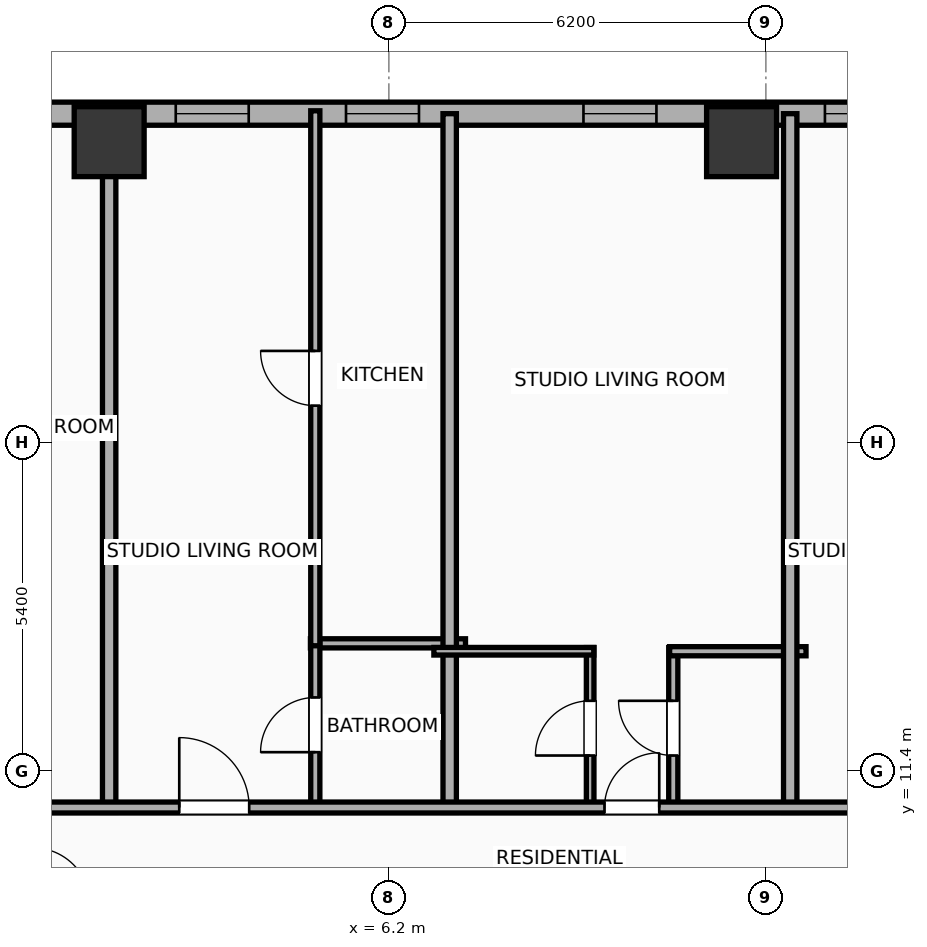
"""IFC4 building model, lengths in metres.
Left out: names, types, materials, properties, quantities, classifications, styles, units other than length and angle.
Written with IfcOpenShell. Run it as: python <this file> out.ifc"""

import sys

from ifc_helpers import new_model, si_unit, direction, frame, frame_2d, origin, origin_2d, place, context, subcontext, project, spatial, rectangle, hollow_rectangle, extrude, element, fill, save


model = new_model("IFC4")
c1 = context("Model", 3, precision=1e-05, world=origin(), true_north=direction((0.0, 1.0)))
c2 = subcontext(c1, "Body", "Model", "MODEL_VIEW")
j1 = project(units=[si_unit("LENGTHUNIT", "METRE"), si_unit("PLANEANGLEUNIT", "RADIAN")], contexts=[c1])
p1 = place(None, origin())
s1 = spatial("IfcSite", under=j1, at=p1, CompositionType="ELEMENT")
p2 = place(p1, origin())
s2 = spatial("IfcBuilding", under=s1, at=p2, CompositionType="ELEMENT")
p3 = place(p2, frame((0.0, 0.0, 29.9)))
s3 = spatial("IfcBuildingStorey", under=s2, at=p3, CompositionType="ELEMENT", Elevation=29.9)
for number, where, z_axis, x_axis in (
    (1, (12.0, 21.75, 0.0), (0.0, 0.0, 1.0), (1.0, 0.0, 0.0)),
    (2, (1.6, 21.75, 0.0), (0.0, 0.0, 1.0), (1.0, 0.0, 0.0)),
):
    element("IfcColumn", number, at=place(p3, frame(where, z_axis=z_axis, x_axis=x_axis)), inside=s3, PredefinedType="COLUMN", context=c2, shape_type="SweptSolid", body=[
        extrude(hollow_rectangle(XDim=1.15, YDim=1.15, WallThickness=0.04, at=origin_2d()), origin(), (0.0, 0.0, 1.0), 3.9),
    ])
p4 = place(p3, frame((-29.581, 22.21, 0.0), z_axis=(0.0, 0.0, 1.0), x_axis=(1.0, 0.0, 0.0)))
e3 = element("IfcWall", 3, at=p4, inside=s3, PredefinedType="ELEMENTEDWALL", context=c2, shape_type="SweptSolid", body=[
    extrude(rectangle(XDim=51.963, YDim=0.38, at=frame_2d((25.981, 0.0))), origin(), (0.0, 0.0, 1.0), 2.54),
])
p5 = place(p4, frame((5.81, 0.0, 0.75)))
e4 = element("IfcOpeningElement", 4, at=p5, cuts=e3, PredefinedType="OPENING", context=c2, shape_type="SweptSolid", body=[
    extrude(rectangle(XDim=2.4, YDim=1.63, at=frame_2d((1.2, 0.815))), frame((0.0, 0.2, 0.0), z_axis=(0.0, -1.0, 0.0), x_axis=(1.0, 0.0, 0.0)), (0.0, 0.0, 1.0), 0.4),
])
p6 = place(p4, frame((42.952, 0.0, 0.75)))
e5 = element("IfcOpeningElement", 5, at=p6, cuts=e3, PredefinedType="OPENING", context=c2, shape_type="SweptSolid", body=[
    extrude(rectangle(XDim=2.4, YDim=1.63, at=frame_2d((1.2, 0.815))), frame((0.0, 0.2, 0.0), z_axis=(0.0, -1.0, 0.0), x_axis=(1.0, 0.0, 0.0)), (0.0, 0.0, 1.0), 0.4),
])
p7 = place(p4, frame((1.436, 0.0, 0.75)))
e6 = element("IfcOpeningElement", 6, at=p7, cuts=e3, PredefinedType="OPENING", context=c2, shape_type="SweptSolid", body=[
    extrude(rectangle(XDim=1.2, YDim=1.63, at=frame_2d((0.6, 0.815))), frame((0.0, 0.2, 0.0), z_axis=(0.0, -1.0, 0.0), x_axis=(1.0, 0.0, 0.0)), (0.0, 0.0, 1.0), 0.4),
])
p8 = place(p4, frame((3.686, 0.0, 0.75)))
e7 = element("IfcOpeningElement", 7, at=p8, cuts=e3, PredefinedType="OPENING", context=c2, shape_type="SweptSolid", body=[
    extrude(rectangle(XDim=1.2, YDim=1.63, at=frame_2d((0.6, 0.815))), frame((0.0, 0.2, 0.0), z_axis=(0.0, -1.0, 0.0), x_axis=(1.0, 0.0, 0.0)), (0.0, 0.0, 1.0), 0.4),
])
p9 = place(p4, frame((11.221, 0.0, 0.75)))
e8 = element("IfcOpeningElement", 8, at=p9, cuts=e3, PredefinedType="OPENING", context=c2, shape_type="SweptSolid", body=[
    extrude(rectangle(XDim=1.2, YDim=1.63, at=frame_2d((0.6, 0.815))), frame((0.0, 0.2, 0.0), z_axis=(0.0, -1.0, 0.0), x_axis=(1.0, 0.0, 0.0)), (0.0, 0.0, 1.0), 0.4),
])
p10 = place(p4, frame((17.686, 0.0, 0.75)))
e9 = element("IfcOpeningElement", 9, at=p10, cuts=e3, PredefinedType="OPENING", context=c2, shape_type="SweptSolid", body=[
    extrude(rectangle(XDim=1.2, YDim=1.63, at=frame_2d((0.6, 0.815))), frame((0.0, 0.2, 0.0), z_axis=(0.0, -1.0, 0.0), x_axis=(1.0, 0.0, 0.0)), (0.0, 0.0, 1.0), 0.4),
])
p11 = place(p4, frame((14.886, 0.0, 0.75)))
e10 = element("IfcOpeningElement", 10, at=p11, cuts=e3, PredefinedType="OPENING", context=c2, shape_type="SweptSolid", body=[
    extrude(rectangle(XDim=1.2, YDim=1.63, at=frame_2d((0.6, 0.815))), frame((0.0, 0.2, 0.0), z_axis=(0.0, -1.0, 0.0), x_axis=(1.0, 0.0, 0.0)), (0.0, 0.0, 1.0), 0.4),
])
p12 = place(p4, frame((22.181, 0.0, 0.75)))
e11 = element("IfcOpeningElement", 11, at=p12, cuts=e3, PredefinedType="OPENING", context=c2, shape_type="SweptSolid", body=[
    extrude(rectangle(XDim=1.2, YDim=1.63, at=frame_2d((0.6, 0.815))), frame((0.0, 0.2, 0.0), z_axis=(0.0, -1.0, 0.0), x_axis=(1.0, 0.0, 0.0)), (0.0, 0.0, 1.0), 0.4),
])
p13 = place(p4, frame((28.926, 0.0, 0.75)))
e12 = element("IfcOpeningElement", 12, at=p13, cuts=e3, PredefinedType="OPENING", context=c2, shape_type="SweptSolid", body=[
    extrude(rectangle(XDim=1.2, YDim=1.63, at=frame_2d((0.6, 0.815))), frame((0.0, 0.2, 0.0), z_axis=(0.0, -1.0, 0.0), x_axis=(1.0, 0.0, 0.0)), (0.0, 0.0, 1.0), 0.4),
])
p14 = place(p4, frame((26.126, 0.0, 0.75)))
e13 = element("IfcOpeningElement", 13, at=p14, cuts=e3, PredefinedType="OPENING", context=c2, shape_type="SweptSolid", body=[
    extrude(rectangle(XDim=1.2, YDim=1.63, at=frame_2d((0.6, 0.815))), frame((0.0, 0.2, 0.0), z_axis=(0.0, -1.0, 0.0), x_axis=(1.0, 0.0, 0.0)), (0.0, 0.0, 1.0), 0.4),
])
p15 = place(p4, frame((32.276, 0.0, 0.75)))
e14 = element("IfcOpeningElement", 14, at=p15, cuts=e3, PredefinedType="OPENING", context=c2, shape_type="SweptSolid", body=[
    extrude(rectangle(XDim=1.2, YDim=1.63, at=frame_2d((0.6, 0.815))), frame((0.0, 0.2, 0.0), z_axis=(0.0, -1.0, 0.0), x_axis=(1.0, 0.0, 0.0)), (0.0, 0.0, 1.0), 0.4),
])
p16 = place(p4, frame((35.076, 0.0, 0.75)))
e15 = element("IfcOpeningElement", 15, at=p16, cuts=e3, PredefinedType="OPENING", context=c2, shape_type="SweptSolid", body=[
    extrude(rectangle(XDim=1.2, YDim=1.63, at=frame_2d((0.6, 0.815))), frame((0.0, 0.2, 0.0), z_axis=(0.0, -1.0, 0.0), x_axis=(1.0, 0.0, 0.0)), (0.0, 0.0, 1.0), 0.4),
])
p17 = place(p4, frame((38.981, 0.0, 0.75)))
e16 = element("IfcOpeningElement", 16, at=p17, cuts=e3, PredefinedType="OPENING", context=c2, shape_type="SweptSolid", body=[
    extrude(rectangle(XDim=1.2, YDim=1.63, at=frame_2d((0.6, 0.815))), frame((0.0, 0.2, 0.0), z_axis=(0.0, -1.0, 0.0), x_axis=(1.0, 0.0, 0.0)), (0.0, 0.0, 1.0), 0.4),
])
p18 = place(p4, frame((46.276, 0.0, 0.75)))
e17 = element("IfcOpeningElement", 17, at=p18, cuts=e3, PredefinedType="OPENING", context=c2, shape_type="SweptSolid", body=[
    extrude(rectangle(XDim=1.2, YDim=1.63, at=frame_2d((0.6, 0.815))), frame((0.0, 0.2, 0.0), z_axis=(0.0, -1.0, 0.0), x_axis=(1.0, 0.0, 0.0)), (0.0, 0.0, 1.0), 0.4),
])
p19 = place(p4, frame((48.927, 0.0, 0.75)))
e18 = element("IfcOpeningElement", 18, at=p19, cuts=e3, PredefinedType="OPENING", context=c2, shape_type="SweptSolid", body=[
    extrude(rectangle(XDim=1.2, YDim=1.63, at=frame_2d((0.6, 0.815))), frame((0.0, 0.2, 0.0), z_axis=(0.0, -1.0, 0.0), x_axis=(1.0, 0.0, 0.0)), (0.0, 0.0, 1.0), 0.4),
])
p20 = place(p3, frame((1.6, 10.72, 0.0), z_axis=(0.0, 0.0, 1.0), x_axis=(0.0, 1.0, 0.0)))
e19 = element("IfcWall", 19, at=p20, inside=s3, PredefinedType="PARTITIONING", context=c2, shape_type="SweptSolid", body=[
    extrude(rectangle(XDim=11.49, YDim=0.22, at=frame_2d((5.745, 0.0))), origin(), (0.0, 0.0, 1.0), 2.54),
])
p21 = place(p3, frame((4.91, 13.5, 0.0), z_axis=(0.0, 0.0, 1.0), x_axis=(1.0, 0.0, 0.0)))
e20 = element("IfcWall", 20, at=p21, inside=s3, PredefinedType="PLUMBINGWALL", context=c2, shape_type="SweptSolid", body=[
    extrude(rectangle(XDim=2.55, YDim=0.15, at=frame_2d((1.275, 0.0))), origin(), (0.0, 0.0, 1.0), 3.65),
])
p22 = place(p3, frame((4.99, 10.78, 0.0), z_axis=(0.0, 0.0, 1.0), x_axis=(0.0, 1.0, 0.0)))
e21 = element("IfcWall", 21, at=p22, inside=s3, PredefinedType="PLUMBINGWALL", context=c2, shape_type="SweptSolid", body=[
    extrude(rectangle(XDim=2.76, YDim=0.15, at=frame_2d((1.38, 0.0))), origin(), (0.0, 0.0, 1.0), 3.65),
])
p23 = place(p22, frame((0.93, 0.0, 0.0)))
e22 = element("IfcOpeningElement", 22, at=p23, cuts=e21, PredefinedType="OPENING", context=c2, shape_type="SweptSolid", body=[
    extrude(rectangle(XDim=0.9, YDim=2.05, at=frame_2d((0.45, 1.025))), frame((0.0, 0.085, 0.0), z_axis=(0.0, -1.0, 0.0), x_axis=(1.0, 0.0, 0.0)), (0.0, 0.0, 1.0), 0.17),
])
p24 = place(p3, frame((4.99, 13.46, 0.0), z_axis=(0.0, 0.0, 1.0), x_axis=(0.0, 1.0, 0.0)))
e23 = element("IfcWall", 23, at=p24, inside=s3, PredefinedType="PLUMBINGWALL", context=c2, shape_type="SweptSolid", body=[
    extrude(rectangle(XDim=8.798, YDim=0.15, at=frame_2d((4.399, 0.0))), origin(), (0.0, 0.0, 1.0), 3.65),
])
p25 = place(p24, frame((3.949, 0.0, 0.0)))
e24 = element("IfcOpeningElement", 24, at=p25, cuts=e23, PredefinedType="OPENING", context=c2, shape_type="SweptSolid", body=[
    extrude(rectangle(XDim=0.9, YDim=2.05, at=frame_2d((0.45, 1.025))), frame((0.0, 0.085, 0.0), z_axis=(0.0, -1.0, 0.0), x_axis=(1.0, 0.0, 0.0)), (0.0, 0.0, 1.0), 0.17),
])
p26 = place(p3, frame((7.2, 10.72, 0.0), z_axis=(0.0, 0.0, 1.0), x_axis=(0.0, 1.0, 0.0)))
e25 = element("IfcWall", 25, at=p26, inside=s3, PredefinedType="PARTITIONING", context=c2, shape_type="SweptSolid", body=[
    extrude(rectangle(XDim=11.49, YDim=0.22, at=frame_2d((5.745, 0.0))), origin(), (0.0, 0.0, 1.0), 3.65),
])
p27 = place(p3, frame((9.51, 10.78, 0.0), z_axis=(0.0, 0.0, 1.0), x_axis=(0.0, 1.0, 0.0)))
e26 = element("IfcWall", 26, at=p27, inside=s3, PredefinedType="PARTITIONING", context=c2, shape_type="SweptSolid", body=[
    extrude(rectangle(XDim=2.65, YDim=0.125, at=frame_2d((1.325, 0.0))), origin(), (0.0, 0.0, 1.0), 3.65),
])
p28 = place(p27, frame((0.875, 0.0, 0.0)))
e27 = element("IfcOpeningElement", 27, at=p28, cuts=e26, PredefinedType="OPENING", context=c2, shape_type="SweptSolid", body=[
    extrude(rectangle(XDim=0.9, YDim=2.05, at=frame_2d((0.45, 1.025))), frame((0.0, 0.073, 0.0), z_axis=(0.0, -1.0, 0.0), x_axis=(1.0, 0.0, 0.0)), (0.0, 0.0, 1.0), 0.145),
])
p29 = place(p3, frame((10.877, 10.78, 0.0), z_axis=(0.0, 0.0, 1.0), x_axis=(0.0, 1.0, 0.0)))
e28 = element("IfcWall", 28, at=p29, inside=s3, PredefinedType="PLUMBINGWALL", context=c2, shape_type="SweptSolid", body=[
    extrude(rectangle(XDim=2.65, YDim=0.15, at=frame_2d((1.325, 0.0))), origin(), (0.0, 0.0, 1.0), 3.65),
])
p30 = place(p29, frame((0.875, 0.0, 0.0)))
e29 = element("IfcOpeningElement", 29, at=p30, cuts=e28, PredefinedType="OPENING", context=c2, shape_type="SweptSolid", body=[
    extrude(rectangle(XDim=0.9, YDim=2.05, at=frame_2d((0.45, 1.025))), frame((0.0, 0.085, 0.0), z_axis=(0.0, -1.0, 0.0), x_axis=(1.0, 0.0, 0.0)), (0.0, 0.0, 1.0), 0.17),
])
p31 = place(p3, frame((6.94, 13.37, 0.0), z_axis=(0.0, 0.0, 1.0), x_axis=(1.0, 0.0, 0.0)))
e30 = element("IfcWall", 30, at=p31, inside=s3, PredefinedType="PARTITIONING", context=c2, shape_type="SweptSolid", body=[
    extrude(rectangle(XDim=2.63, YDim=0.125, at=frame_2d((1.315, 0.0))), origin(), (0.0, 0.0, 1.0), 3.65),
])
p32 = place(p3, frame((10.817, 13.37, 0.0), z_axis=(0.0, 0.0, 1.0), x_axis=(1.0, 0.0, 0.0)))
e31 = element("IfcWall", 31, at=p32, inside=s3, PredefinedType="PLUMBINGWALL", context=c2, shape_type="SweptSolid", body=[
    extrude(rectangle(XDim=2.243, YDim=0.15, at=frame_2d((1.122, 0.0))), origin(), (0.0, 0.0, 1.0), 3.65),
])
p33 = place(p3, frame((12.8, 10.72, 0.0), z_axis=(0.0, 0.0, 1.0), x_axis=(0.0, 1.0, 0.0)))
e32 = element("IfcWall", 32, at=p33, inside=s3, PredefinedType="PARTITIONING", context=c2, shape_type="SweptSolid", body=[
    extrude(rectangle(XDim=11.49, YDim=0.22, at=frame_2d((5.745, 0.0))), origin(), (0.0, 0.0, 1.0), 2.54),
])
p34 = place(p3, frame((-33.41, 10.8, 0.0), z_axis=(0.0, 0.0, 1.0), x_axis=(1.0, 0.0, 0.0)))
e33 = element("IfcWall", 33, at=p34, inside=s3, PredefinedType="PARTITIONING", context=c2, shape_type="SweptSolid", body=[
    extrude(rectangle(XDim=59.62, YDim=0.18, at=frame_2d((29.81, 0.0))), origin(), (0.0, 0.0, 1.0), 3.65),
])
p35 = place(p34, frame((3.062, 0.0, 0.0)))
e34 = element("IfcOpeningElement", 34, at=p35, cuts=e33, PredefinedType="OPENING", context=c2, shape_type="SweptSolid", body=[
    extrude(rectangle(XDim=1.15, YDim=2.05, at=frame_2d((0.575, 1.025))), frame((0.0, 0.1, 0.0), z_axis=(0.0, -1.0, 0.0), x_axis=(1.0, 0.0, 0.0)), (0.0, 0.0, 1.0), 0.2),
])
p36 = place(p34, frame((10.312, 0.0, 0.0)))
e35 = element("IfcOpeningElement", 35, at=p36, cuts=e33, PredefinedType="OPENING", context=c2, shape_type="SweptSolid", body=[
    extrude(rectangle(XDim=1.15, YDim=2.05, at=frame_2d((0.575, 1.025))), frame((0.0, 0.1, 0.0), z_axis=(0.0, -1.0, 0.0), x_axis=(1.0, 0.0, 0.0)), (0.0, 0.0, 1.0), 0.2),
])
p37 = place(p34, frame((15.153, 0.0, 0.0)))
e36 = element("IfcOpeningElement", 36, at=p37, cuts=e33, PredefinedType="OPENING", context=c2, shape_type="SweptSolid", body=[
    extrude(rectangle(XDim=0.9, YDim=2.05, at=frame_2d((0.45, 1.025))), frame((0.0, 0.1, 0.0), z_axis=(0.0, -1.0, 0.0), x_axis=(1.0, 0.0, 0.0)), (0.0, 0.0, 1.0), 0.2),
])
p38 = place(p34, frame((21.508, 0.0, 0.0)))
e37 = element("IfcOpeningElement", 37, at=p38, cuts=e33, PredefinedType="OPENING", context=c2, shape_type="SweptSolid", body=[
    extrude(rectangle(XDim=1.15, YDim=2.05, at=frame_2d((0.575, 1.025))), frame((0.0, 0.1, 0.0), z_axis=(0.0, -1.0, 0.0), x_axis=(1.0, 0.0, 0.0)), (0.0, 0.0, 1.0), 0.2),
])
p39 = place(p34, frame((26.355, 0.0, 0.0)))
e38 = element("IfcOpeningElement", 38, at=p39, cuts=e33, PredefinedType="OPENING", context=c2, shape_type="SweptSolid", body=[
    extrude(rectangle(XDim=0.9, YDim=2.05, at=frame_2d((0.45, 1.025))), frame((0.0, 0.1, 0.0), z_axis=(0.0, -1.0, 0.0), x_axis=(1.0, 0.0, 0.0)), (0.0, 0.0, 1.0), 0.2),
])
p40 = place(p34, frame((32.753, 0.0, 0.0)))
e39 = element("IfcOpeningElement", 39, at=p40, cuts=e33, PredefinedType="OPENING", context=c2, shape_type="SweptSolid", body=[
    extrude(rectangle(XDim=1.15, YDim=2.05, at=frame_2d((0.575, 1.025))), frame((0.0, 0.1, 0.0), z_axis=(0.0, -1.0, 0.0), x_axis=(1.0, 0.0, 0.0)), (0.0, 0.0, 1.0), 0.2),
])
p41 = place(p34, frame((36.163, 0.0, 0.0)))
e40 = element("IfcOpeningElement", 40, at=p41, cuts=e33, PredefinedType="OPENING", context=c2, shape_type="SweptSolid", body=[
    extrude(rectangle(XDim=1.15, YDim=2.05, at=frame_2d((0.575, 1.025))), frame((0.0, 0.1, 0.0), z_axis=(0.0, -1.0, 0.0), x_axis=(1.0, 0.0, 0.0)), (0.0, 0.0, 1.0), 0.2),
])
p42 = place(p34, frame((43.156, 0.0, 0.0)))
e41 = element("IfcOpeningElement", 41, at=p42, cuts=e33, PredefinedType="OPENING", context=c2, shape_type="SweptSolid", body=[
    extrude(rectangle(XDim=0.9, YDim=2.05, at=frame_2d((0.45, 1.025))), frame((0.0, 0.1, 0.0), z_axis=(0.0, -1.0, 0.0), x_axis=(1.0, 0.0, 0.0)), (0.0, 0.0, 1.0), 0.2),
])
p43 = place(p34, frame((47.36, 0.0, 0.0)))
e42 = element("IfcOpeningElement", 42, at=p43, cuts=e33, PredefinedType="OPENING", context=c2, shape_type="SweptSolid", body=[
    extrude(rectangle(XDim=1.15, YDim=2.05, at=frame_2d((0.575, 1.025))), frame((0.0, 0.1, 0.0), z_axis=(0.0, -1.0, 0.0), x_axis=(1.0, 0.0, 0.0)), (0.0, 0.0, 1.0), 0.2),
])
p44 = place(p34, frame((55.337, 0.0, 0.0)))
e43 = element("IfcOpeningElement", 43, at=p44, cuts=e33, PredefinedType="OPENING", context=c2, shape_type="SweptSolid", body=[
    extrude(rectangle(XDim=1.15, YDim=2.05, at=frame_2d((0.575, 1.025))), frame((0.0, 0.1, 0.0), z_axis=(0.0, -1.0, 0.0), x_axis=(1.0, 0.0, 0.0)), (0.0, 0.0, 1.0), 0.2),
])
p45 = place(p6, origin())
e44 = element("IfcWindow", 44, at=p45, inside=s3, PartitioningType="SINGLE_PANEL", PredefinedType="WINDOW", context=c2, shape_type="SweptSolid", body=[
    extrude(rectangle(XDim=2.4, YDim=1.63, at=frame_2d((1.2, 0.815))), frame((0.0, 0.03, 0.0), z_axis=(0.0, -1.0, 0.0), x_axis=(1.0, 0.0, 0.0)), (0.0, 0.0, 1.0), 0.06),
])
fill(e5, e44)
p46 = place(p15, origin())
e45 = element("IfcWindow", 45, at=p46, inside=s3, PartitioningType="SINGLE_PANEL", PredefinedType="WINDOW", context=c2, shape_type="SweptSolid", body=[
    extrude(rectangle(XDim=1.2, YDim=1.63, at=frame_2d((0.6, 0.815))), frame((0.0, 0.03, 0.0), z_axis=(0.0, -1.0, 0.0), x_axis=(1.0, 0.0, 0.0)), (0.0, 0.0, 1.0), 0.06),
])
fill(e14, e45)
p47 = place(p16, origin())
e46 = element("IfcWindow", 46, at=p47, inside=s3, PartitioningType="SINGLE_PANEL", PredefinedType="WINDOW", context=c2, shape_type="SweptSolid", body=[
    extrude(rectangle(XDim=1.2, YDim=1.63, at=frame_2d((0.6, 0.815))), frame((0.0, 0.03, 0.0), z_axis=(0.0, -1.0, 0.0), x_axis=(1.0, 0.0, 0.0)), (0.0, 0.0, 1.0), 0.06),
])
fill(e15, e46)
p48 = place(p17, origin())
e47 = element("IfcWindow", 47, at=p48, inside=s3, PartitioningType="SINGLE_PANEL", PredefinedType="WINDOW", context=c2, shape_type="SweptSolid", body=[
    extrude(rectangle(XDim=1.2, YDim=1.63, at=frame_2d((0.6, 0.815))), frame((0.0, 0.03, 0.0), z_axis=(0.0, -1.0, 0.0), x_axis=(1.0, 0.0, 0.0)), (0.0, 0.0, 1.0), 0.06),
])
fill(e16, e47)
p49 = place(p23, origin())
e48 = element("IfcDoor", 48, at=p49, inside=s3, OperationType="SINGLE_SWING_LEFT", PredefinedType="DOOR", context=c2, shape_type="SweptSolid", body=[
    extrude(rectangle(XDim=0.9, YDim=2.05, at=frame_2d((0.45, 1.025))), frame((0.0, 0.025, 0.0), z_axis=(0.0, -1.0, 0.0), x_axis=(1.0, 0.0, 0.0)), (0.0, 0.0, 1.0), 0.05),
])
fill(e22, e48)
p50 = place(p25, origin())
e49 = element("IfcDoor", 49, at=p50, inside=s3, OperationType="SINGLE_SWING_RIGHT", PredefinedType="DOOR", context=c2, shape_type="SweptSolid", body=[
    extrude(rectangle(XDim=0.9, YDim=2.05, at=frame_2d((0.45, 1.025))), frame((0.0, 0.025, 0.0), z_axis=(0.0, -1.0, 0.0), x_axis=(1.0, 0.0, 0.0)), (0.0, 0.0, 1.0), 0.05),
])
fill(e24, e49)
p51 = place(p28, origin())
e50 = element("IfcDoor", 50, at=p51, inside=s3, OperationType="SINGLE_SWING_LEFT", PredefinedType="DOOR", context=c2, shape_type="SweptSolid", body=[
    extrude(rectangle(XDim=0.9, YDim=2.05, at=frame_2d((0.45, 1.025))), frame((0.0, 0.025, 0.0), z_axis=(0.0, -1.0, 0.0), x_axis=(1.0, 0.0, 0.0)), (0.0, 0.0, 1.0), 0.05),
])
fill(e27, e50)
p52 = place(p30, origin())
e51 = element("IfcDoor", 51, at=p52, inside=s3, OperationType="SINGLE_SWING_RIGHT", PredefinedType="DOOR", context=c2, shape_type="SweptSolid", body=[
    extrude(rectangle(XDim=0.9, YDim=2.05, at=frame_2d((0.45, 1.025))), frame((0.0, 0.025, 0.0), z_axis=(0.0, -1.0, 0.0), x_axis=(1.0, 0.0, 0.0)), (0.0, 0.0, 1.0), 0.05),
])
fill(e29, e51)
p53 = place(p41, origin())
e52 = element("IfcDoor", 52, at=p53, inside=s3, OperationType="SINGLE_SWING_LEFT", PredefinedType="DOOR", context=c2, shape_type="SweptSolid", body=[
    extrude(rectangle(XDim=1.15, YDim=2.05, at=frame_2d((0.575, 1.025))), frame((0.0, 0.025, 0.0), z_axis=(0.0, -1.0, 0.0), x_axis=(1.0, 0.0, 0.0)), (0.0, 0.0, 1.0), 0.05),
])
fill(e40, e52)
p54 = place(p42, origin())
e53 = element("IfcDoor", 53, at=p54, inside=s3, OperationType="SINGLE_SWING_RIGHT", PredefinedType="DOOR", context=c2, shape_type="SweptSolid", body=[
    extrude(rectangle(XDim=0.9, YDim=2.05, at=frame_2d((0.45, 1.025))), frame((0.0, 0.025, 0.0), z_axis=(0.0, -1.0, 0.0), x_axis=(1.0, 0.0, 0.0)), (0.0, 0.0, 1.0), 0.05),
])
fill(e41, e53)
save(model, sys.argv[1])
